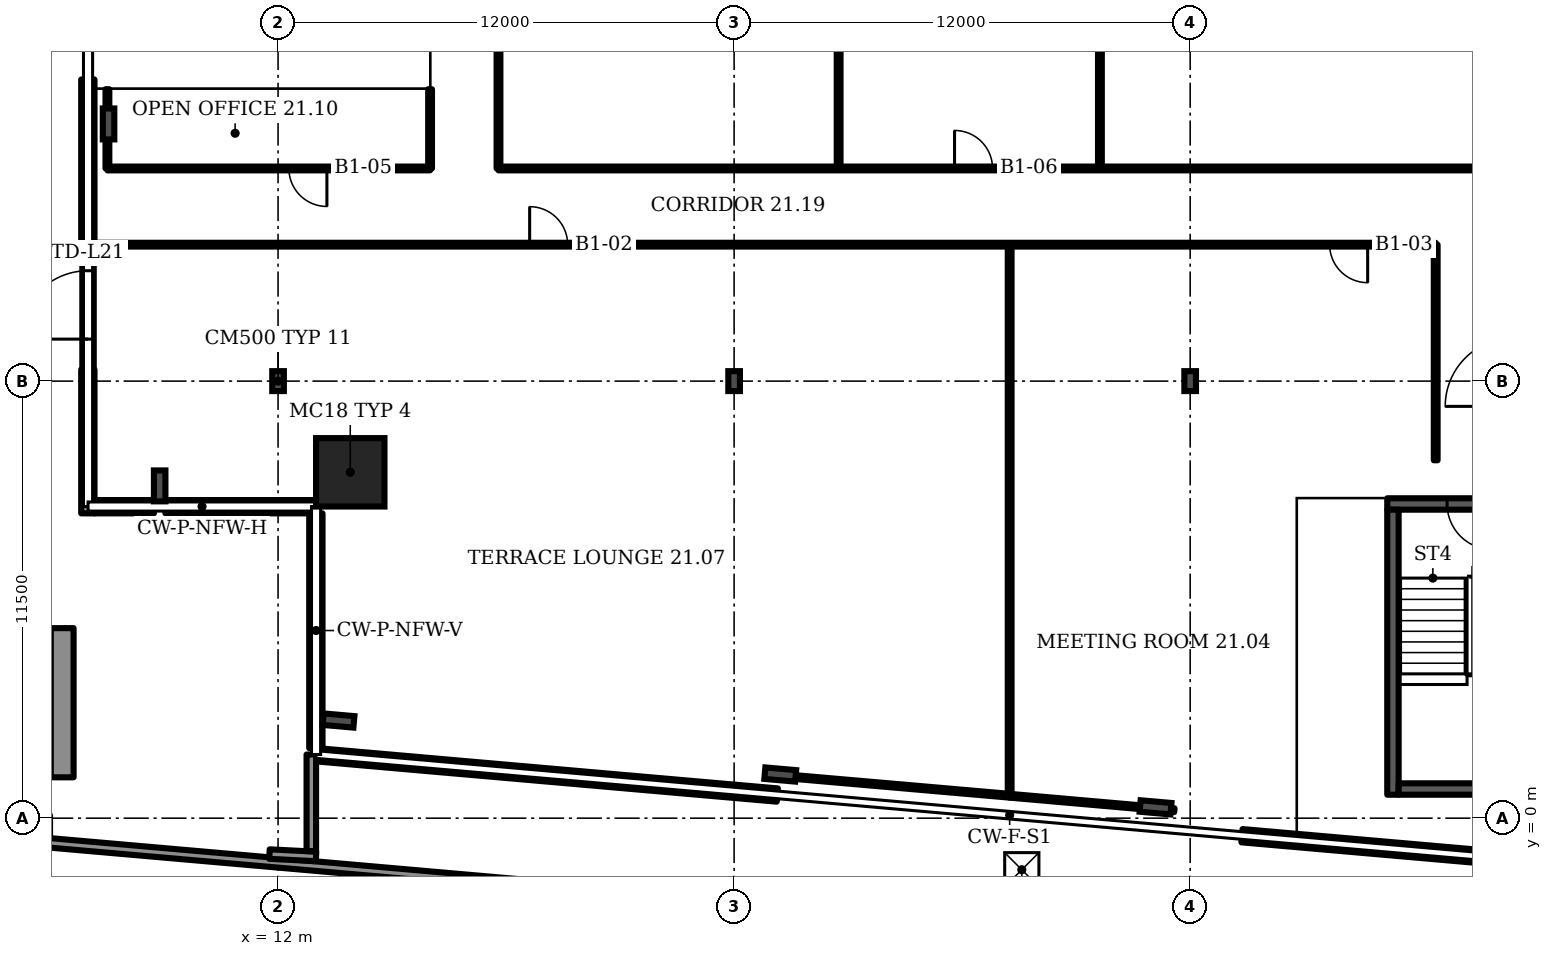
"""IFC4 building model, lengths in metres.
Left out: names, types, materials, properties, quantities, classifications, styles, units other than length and angle.
Written with IfcOpenShell. Run it as: python <this file> out.ifc"""

import sys

from ifc_helpers import new_model, si_unit, direction, frame, frame_2d, origin, origin_2d, place, context, subcontext, project, spatial, rectangle, i_section, extrude, element, fill, save


model = new_model("IFC4")
c1 = context("Model", 3, precision=1e-05, world=origin(), true_north=direction((0.0, 1.0)))
c2 = subcontext(c1, "Body", "Model", "MODEL_VIEW")
j1 = project(units=[si_unit("LENGTHUNIT", "METRE"), si_unit("PLANEANGLEUNIT", "RADIAN")], contexts=[c1])
p1 = place(None, origin())
s1 = spatial("IfcSite", under=j1, at=p1, CompositionType="ELEMENT")
p2 = place(p1, origin())
s2 = spatial("IfcBuilding", under=s1, at=p2, CompositionType="ELEMENT")
p3 = place(p2, frame((0.0, 0.0, 96.7)))
s3 = spatial("IfcBuildingStorey", under=s2, at=p3, CompositionType="ELEMENT", Elevation=96.7)
p4 = place(p3, frame((13.9, 9.1, 0.0), z_axis=(0.0, 0.0, 1.0), x_axis=(1.0, 0.0, 0.0)))
e1 = element("IfcColumn", 1, at=p4, inside=s3, PredefinedType="COLUMN", context=c2, shape_type="SweptSolid", body=[
    extrude(rectangle(XDim=1.8, YDim=1.8, at=origin_2d()), origin(), (0.0, 0.0, 1.0), 3.6),
])
for number, where, z_axis, x_axis in (
    (2, (13.591, 2.569, 0.0), (0.0, 0.0, 1.0), (-0.087, -0.996, 0.0)),
    (3, (25.214, 1.149, 0.0), (0.0, 0.0, 1.0), (-0.087, -0.996, 0.0)),
    (4, (35.089, 0.285, 0.0), (0.0, 0.0, 1.0), (-0.087, -0.996, 0.0)),
    (5, (7.54, 18.267, 0.0), (0.0, 0.0, 1.0), (-1.0, 0.0, 0.0)),
    (6, (8.885, 8.743, 0.0), (0.0, 0.0, 1.0), (-1.0, 0.0, 0.0)),
):
    element("IfcColumn", number, at=place(p3, frame(where, z_axis=z_axis, x_axis=x_axis)), inside=s3, PredefinedType="COLUMN", context=c2, shape_type="SweptSolid", body=[
        extrude(i_section(OverallWidth=0.303, OverallDepth=0.814, WebThickness=0.021, FlangeThickness=0.04, FilletRadius=0.03, at=origin_2d()), origin(), (0.0, 0.0, 1.0), 3.6),
    ])
for number, where, z_axis, x_axis in (
    (7, (12.0, 11.5, 0.0), (0.0, 0.0, 1.0), (1.0, 0.0, 0.0)),
    (8, (24.0, 11.5, 0.0), (0.0, 0.0, 1.0), (1.0, 0.0, 0.0)),
    (9, (36.0, 11.5, 0.0), (0.0, 0.0, 1.0), (1.0, 0.0, 0.0)),
):
    element("IfcColumn", number, at=place(p3, frame(where, z_axis=z_axis, x_axis=x_axis)), inside=s3, PredefinedType="COLUMN", context=c2, shape_type="SweptSolid", body=[
        extrude(i_section(OverallWidth=0.306, OverallDepth=0.524, WebThickness=0.021, FlangeThickness=0.04, FilletRadius=0.027, at=origin_2d()), origin(), (0.0, 0.0, 1.0), 3.6),
    ])
p5 = place(p3, frame((45.97, -4.147, 0.0), z_axis=(0.0, 0.0, 1.0), x_axis=(-0.996199, 0.087156, 0.0)))
e10 = element("IfcWall", 10, at=p5, inside=s3, PredefinedType="PARAPET", context=c2, shape_type="SweptSolid", body=[
    extrude(rectangle(XDim=40.259, YDim=0.25, at=frame_2d((20.129, 0.0))), origin(), (0.0, 0.0, 1.0), 1.1),
])
p6 = place(p3, frame((11.773, -0.945, 0.0), z_axis=(0.0, 0.0, 1.0), x_axis=(0.998698, -0.051088, 0.0)))
e11 = element("IfcWall", 11, at=p6, inside=s3, PredefinedType="PARAPET", context=c2, shape_type="SweptSolid", body=[
    extrude(rectangle(XDim=1.228, YDim=0.25, at=frame_2d((0.614, 0.0))), origin(), (0.0, 0.0, 1.0), 1.1),
])
p7 = place(p3, frame((12.875, -0.866, 0.0), z_axis=(0.0, 0.0, 1.0), x_axis=(0.0, 1.0, 0.0)))
e12 = element("IfcWall", 12, at=p7, inside=s3, PredefinedType="PARAPET", context=c2, shape_type="SweptSolid", body=[
    extrude(rectangle(XDim=2.541, YDim=0.25, at=frame_2d((1.271, 0.0))), origin(), (0.0, 0.0, 1.0), 1.1),
])
p8 = place(p3, frame((6.32, 1.075, 0.0), z_axis=(0.0, 0.0, 1.0), x_axis=(0.0, 1.0, 0.0)))
e13 = element("IfcWall", 13, at=p8, inside=s3, PredefinedType="SOLIDWALL", context=c2, shape_type="SweptSolid", body=[
    extrude(rectangle(XDim=3.925, YDim=0.6, at=frame_2d((1.962, 0.0))), origin(), (0.0, 0.0, 1.0), 0.8),
])
p9 = place(p3, frame((13.015, 1.669, 0.0), z_axis=(0.0, 0.0, 1.0), x_axis=(0.996194, -0.087163, 0.0)))
e14 = element("IfcWall", 14, at=p9, inside=s3, PredefinedType="SOLIDWALL", context=c2, shape_type="SweptSolid", body=[
    extrude(rectangle(XDim=12.167, YDim=0.35, at=frame_2d((6.084, 0.0))), origin(), (0.0, 0.0, 1.0), 1.0),
])
p10 = place(p3, frame((37.363, -0.461, 0.0), z_axis=(0.0, 0.0, 1.0), x_axis=(0.996194, -0.087159, 0.0)))
e15 = element("IfcWall", 15, at=p10, inside=s3, PredefinedType="SOLIDWALL", context=c2, shape_type="SweptSolid", body=[
    extrude(rectangle(XDim=12.199, YDim=0.35, at=frame_2d((6.099, 0.0))), origin(), (0.0, 0.0, 1.0), 1.0),
])
p11 = place(p3, frame((6.995, 19.437, 0.0), z_axis=(0.0, 0.0, 1.0), x_axis=(0.0, -1.0, 0.0)))
e16 = element("IfcWall", 16, at=p11, inside=s3, PredefinedType="SOLIDWALL", context=c2, shape_type="SweptSolid", body=[
    extrude(rectangle(XDim=4.232, YDim=0.35, at=frame_2d((2.116, 0.0))), origin(), (0.0, 0.0, 1.0), 1.0),
])
p12 = place(p3, frame((6.995, 11.805, 0.0), z_axis=(0.0, 0.0, 1.0), x_axis=(0.0, -1.0, 0.0)))
e17 = element("IfcWall", 17, at=p12, inside=s3, PredefinedType="SOLIDWALL", context=c2, shape_type="SweptSolid", body=[
    extrude(rectangle(XDim=3.785, YDim=0.35, at=frame_2d((1.892, 0.0))), origin(), (0.0, 0.0, 1.0), 1.0),
])
p13 = place(p3, frame((7.17, 8.195, 0.0), z_axis=(0.0, 0.0, 1.0), x_axis=(1.0, 0.0, 0.0)))
e18 = element("IfcWall", 18, at=p13, inside=s3, PredefinedType="SOLIDWALL", context=c2, shape_type="SweptSolid", body=[
    extrude(rectangle(XDim=1.563, YDim=0.35, at=frame_2d((0.782, 0.0))), origin(), (0.0, 0.0, 1.0), 1.0),
])
p14 = place(p3, frame((9.036, 8.195, 0.0), z_axis=(0.0, 0.0, 1.0), x_axis=(1.0, 0.0, 0.0)))
e19 = element("IfcWall", 19, at=p14, inside=s3, PredefinedType="SOLIDWALL", context=c2, shape_type="SweptSolid", body=[
    extrude(rectangle(XDim=3.964, YDim=0.35, at=frame_2d((1.982, 0.0))), origin(), (0.0, 0.0, 1.0), 1.0),
])
p15 = place(p3, frame((12.995, 8.02, 0.0), z_axis=(0.0, 0.0, 1.0), x_axis=(0.0, -1.0, 0.0)))
e20 = element("IfcWall", 20, at=p15, inside=s3, PredefinedType="SOLIDWALL", context=c2, shape_type="SweptSolid", body=[
    extrude(rectangle(XDim=6.177, YDim=0.35, at=frame_2d((3.088, 0.0))), origin(), (0.0, 0.0, 1.0), 1.0),
])
p16 = place(p3, frame((41.185, 8.267, 0.0), z_axis=(0.0, 0.0, 1.0), x_axis=(1.0, 0.0, 0.0)))
e21 = element("IfcWall", 21, at=p16, inside=s3, PredefinedType="SHEAR", context=c2, shape_type="SweptSolid", body=[
    extrude(rectangle(XDim=4.35, YDim=0.3, at=frame_2d((2.175, 0.0))), origin(), (0.0, 0.0, 1.0), 3.2),
])
p17 = place(p16, frame((1.575, 0.0, 0.0)))
e22 = element("IfcOpeningElement", 22, at=p17, cuts=e21, PredefinedType="OPENING", context=c2, shape_type="SweptSolid", body=[
    extrude(rectangle(XDim=1.2, YDim=2.1, at=frame_2d((0.6, 1.05))), frame((0.0, 0.16, 0.0), z_axis=(0.0, -1.0, 0.0), x_axis=(1.0, 0.0, 0.0)), (0.0, 0.0, 1.0), 0.32),
])
p18 = place(p3, frame((7.02, 15.09, 0.0), z_axis=(0.0, 0.0, 1.0), x_axis=(1.0, 0.0, 0.0)))
e23 = element("IfcWall", 23, at=p18, inside=s3, PredefinedType="PARTITIONING", context=c2, shape_type="SweptSolid", body=[
    extrude(rectangle(XDim=35.44, YDim=0.1, at=frame_2d((17.72, 0.0))), origin(), (0.0, 0.0, 1.0), 3.2),
])
p19 = place(p18, frame((11.6, 0.0, 0.0)))
e24 = element("IfcOpeningElement", 24, at=p19, cuts=e23, PredefinedType="OPENING", context=c2, shape_type="SweptSolid", body=[
    extrude(rectangle(XDim=1.0, YDim=2.1, at=frame_2d((0.5, 1.05))), frame((0.0, 0.06, 0.0), z_axis=(0.0, -1.0, 0.0), x_axis=(1.0, 0.0, 0.0)), (0.0, 0.0, 1.0), 0.12),
])
p20 = place(p18, frame((32.65, 0.0, 0.0)))
e25 = element("IfcOpeningElement", 25, at=p20, cuts=e23, PredefinedType="OPENING", context=c2, shape_type="SweptSolid", body=[
    extrude(rectangle(XDim=1.0, YDim=2.1, at=frame_2d((0.5, 1.05))), frame((0.0, 0.06, 0.0), z_axis=(0.0, -1.0, 0.0), x_axis=(1.0, 0.0, 0.0)), (0.0, 0.0, 1.0), 0.12),
])
p21 = place(p3, frame((7.51, 17.095, 0.0), z_axis=(0.0, 0.0, 1.0), x_axis=(0.0, 1.0, 0.0)))
e26 = element("IfcWall", 26, at=p21, inside=s3, PredefinedType="PARTITIONING", context=c2, shape_type="SweptSolid", body=[
    extrude(rectangle(XDim=2.085, YDim=0.1, at=frame_2d((1.042, 0.0))), origin(), (0.0, 0.0, 1.0), 2.58),
])
p22 = place(p3, frame((7.51, 17.095, 0.0), z_axis=(0.0, 0.0, 1.0), x_axis=(1.0, 0.0, 0.0)))
e27 = element("IfcWall", 27, at=p22, inside=s3, PredefinedType="PARTITIONING", context=c2, shape_type="SweptSolid", body=[
    extrude(rectangle(XDim=8.49, YDim=0.1, at=frame_2d((4.245, 0.0))), origin(), (0.0, 0.0, 1.0), 3.2),
])
p23 = place(p22, frame((4.775, 0.0, 0.0)))
e28 = element("IfcOpeningElement", 28, at=p23, cuts=e27, PredefinedType="OPENING", context=c2, shape_type="SweptSolid", body=[
    extrude(rectangle(XDim=1.0, YDim=2.1, at=frame_2d((0.5, 1.05))), frame((0.0, 0.06, 0.0), z_axis=(0.0, -1.0, 0.0), x_axis=(1.0, 0.0, 0.0)), (0.0, 0.0, 1.0), 0.12),
])
p24 = place(p3, frame((16.0, 17.095, 0.0), z_axis=(0.0, 0.0, 1.0), x_axis=(0.0, 1.0, 0.0)))
e29 = element("IfcWall", 29, at=p24, inside=s3, PredefinedType="PARTITIONING", context=c2, shape_type="SweptSolid", body=[
    extrude(rectangle(XDim=2.085, YDim=0.1, at=frame_2d((1.042, 0.0))), origin(), (0.0, 0.0, 1.0), 3.2),
])
p25 = place(p3, frame((17.8, 17.095, 0.0), z_axis=(0.0, 0.0, 1.0), x_axis=(0.0, 1.0, 0.0)))
e30 = element("IfcWall", 30, at=p25, inside=s3, PredefinedType="PARTITIONING", context=c2, shape_type="SweptSolid", body=[
    extrude(rectangle(XDim=4.075, YDim=0.1, at=frame_2d((2.038, 0.0))), origin(), (0.0, 0.0, 1.0), 3.2),
])
p26 = place(p3, frame((17.8, 17.095, 0.0), z_axis=(0.0, 0.0, 1.0), x_axis=(1.0, 0.0, 0.0)))
e31 = element("IfcWall", 31, at=p26, inside=s3, PredefinedType="PARTITIONING", context=c2, shape_type="SweptSolid", body=[
    extrude(rectangle(XDim=67.8, YDim=0.1, at=frame_2d((33.9, 0.0))), origin(), (0.0, 0.0, 1.0), 3.2),
])
p27 = place(p26, frame((12.0, 0.0, 0.0)))
e32 = element("IfcOpeningElement", 32, at=p27, cuts=e31, PredefinedType="OPENING", context=c2, shape_type="SweptSolid", body=[
    extrude(rectangle(XDim=1.0, YDim=2.1, at=frame_2d((0.5, 1.05))), frame((0.0, 0.06, 0.0), z_axis=(0.0, -1.0, 0.0), x_axis=(1.0, 0.0, 0.0)), (0.0, 0.0, 1.0), 0.12),
])
p28 = place(p26, frame((48.5, 0.0, 0.0)))
e33 = element("IfcOpeningElement", 33, at=p28, cuts=e31, PredefinedType="OPENING", context=c2, shape_type="SweptSolid", body=[
    extrude(rectangle(XDim=1.8, YDim=2.1, at=frame_2d((0.9, 1.05))), frame((0.0, 0.06, 0.0), z_axis=(0.0, -1.0, 0.0), x_axis=(1.0, 0.0, 0.0)), (0.0, 0.0, 1.0), 0.12),
])
p29 = place(p26, frame((56.825, 0.0, 0.0)))
e34 = element("IfcOpeningElement", 34, at=p29, cuts=e31, PredefinedType="OPENING", context=c2, shape_type="SweptSolid", body=[
    extrude(rectangle(XDim=1.0, YDim=2.1, at=frame_2d((0.5, 1.05))), frame((0.0, 0.06, 0.0), z_axis=(0.0, -1.0, 0.0), x_axis=(1.0, 0.0, 0.0)), (0.0, 0.0, 1.0), 0.12),
])
p30 = place(p26, frame((60.825, 0.0, 0.0)))
e35 = element("IfcOpeningElement", 35, at=p30, cuts=e31, PredefinedType="OPENING", context=c2, shape_type="SweptSolid", body=[
    extrude(rectangle(XDim=1.0, YDim=2.1, at=frame_2d((0.5, 1.05))), frame((0.0, 0.06, 0.0), z_axis=(0.0, -1.0, 0.0), x_axis=(1.0, 0.0, 0.0)), (0.0, 0.0, 1.0), 0.12),
])
p31 = place(p26, frame((64.981, 0.0, 0.0)))
e36 = element("IfcOpeningElement", 36, at=p31, cuts=e31, PredefinedType="OPENING", context=c2, shape_type="SweptSolid", body=[
    extrude(rectangle(XDim=1.0, YDim=2.1, at=frame_2d((0.5, 1.05))), frame((0.0, 0.06, 0.0), z_axis=(0.0, -1.0, 0.0), x_axis=(1.0, 0.0, 0.0)), (0.0, 0.0, 1.0), 0.12),
])
p32 = place(p3, frame((26.75, 17.095, 0.0), z_axis=(0.0, 0.0, 1.0), x_axis=(0.0, 1.0, 0.0)))
e37 = element("IfcWall", 37, at=p32, inside=s3, PredefinedType="PARTITIONING", context=c2, shape_type="SweptSolid", body=[
    extrude(rectangle(XDim=13.405, YDim=0.1, at=frame_2d((6.703, 0.0))), origin(), (0.0, 0.0, 1.0), 3.2),
])
p33 = place(p3, frame((31.25, 0.59, 0.0), z_axis=(0.0, 0.0, 1.0), x_axis=(-0.996225, 0.086776, 0.0)))
e38 = element("IfcWall", 38, at=p33, inside=s3, PredefinedType="PARTITIONING", context=c2, shape_type="SweptSolid", body=[
    extrude(rectangle(XDim=6.108, YDim=0.1, at=frame_2d((3.054, 0.0))), origin(), (0.0, 0.0, 1.0), 2.58),
])
p34 = place(p3, frame((31.25, 0.59, 0.0), z_axis=(0.0, 0.0, 1.0), x_axis=(0.0, 1.0, 0.0)))
e39 = element("IfcWall", 39, at=p34, inside=s3, PredefinedType="PARTITIONING", context=c2, shape_type="SweptSolid", body=[
    extrude(rectangle(XDim=14.5, YDim=0.1, at=frame_2d((7.25, 0.0))), origin(), (0.0, 0.0, 1.0), 3.2),
])
p35 = place(p3, frame((33.625, 17.095, 0.0), z_axis=(0.0, 0.0, 1.0), x_axis=(0.0, 1.0, 0.0)))
e40 = element("IfcWall", 40, at=p35, inside=s3, PredefinedType="PARTITIONING", context=c2, shape_type="SweptSolid", body=[
    extrude(rectangle(XDim=13.405, YDim=0.1, at=frame_2d((6.703, 0.0))), origin(), (0.0, 0.0, 1.0), 3.2),
])
p36 = place(p3, frame((35.585, 0.21, 0.0), z_axis=(0.0, 0.0, 1.0), x_axis=(-0.996173, 0.087353, 0.0)))
e41 = element("IfcWall", 41, at=p36, inside=s3, PredefinedType="PARTITIONING", context=c2, shape_type="SweptSolid", body=[
    extrude(rectangle(XDim=4.352, YDim=0.1, at=frame_2d((2.176, 0.0))), origin(), (0.0, 0.0, 1.0), 2.58),
])
p37 = place(p3, frame((42.46, 9.417, 0.0), z_axis=(0.0, 0.0, 1.0), x_axis=(0.0, 1.0, 0.0)))
e42 = element("IfcWall", 42, at=p37, inside=s3, PredefinedType="PARTITIONING", context=c2, shape_type="SweptSolid", body=[
    extrude(rectangle(XDim=5.673, YDim=0.1, at=frame_2d((2.836, 0.0))), origin(), (0.0, 0.0, 1.0), 3.2),
])
p38 = place(p3, frame((7.0, 11.805, 0.0), z_axis=(0.0, 0.0, 1.0), x_axis=(0.0, 1.0, 0.0)))
e43 = element("IfcWall", 43, at=p38, inside=s3, PredefinedType="SOLIDWALL", context=c2, shape_type="SweptSolid", body=[
    extrude(rectangle(XDim=3.4, YDim=0.3, at=frame_2d((1.7, 0.0))), origin(), (0.0, 0.0, 1.0), 3.2),
])
p39 = place(p38, frame((0.8, 0.0, 0.0)))
e44 = element("IfcOpeningElement", 44, at=p39, cuts=e43, PredefinedType="OPENING", context=c2, shape_type="SweptSolid", body=[
    extrude(rectangle(XDim=1.8, YDim=2.1, at=frame_2d((0.9, 1.05))), frame((0.0, 0.16, 0.0), z_axis=(0.0, -1.0, 0.0), x_axis=(1.0, 0.0, 0.0)), (0.0, 0.0, 1.0), 0.32),
])
p40 = place(p3, frame((41.335, 0.617, 0.0), z_axis=(0.0, 0.0, 1.0), x_axis=(0.0, 1.0, 0.0)))
e45 = element("IfcWall", 45, at=p40, inside=s3, PredefinedType="SHEAR", context=c2, shape_type="SweptSolid", body=[
    extrude(rectangle(XDim=7.5, YDim=0.3, at=frame_2d((3.75, 0.0))), origin(), (0.0, 0.0, 1.0), 3.2),
])
p41 = place(p3, frame((41.485, 0.767, 0.0), z_axis=(0.0, 0.0, 1.0), x_axis=(1.0, 0.0, 0.0)))
e46 = element("IfcWall", 46, at=p41, inside=s3, PredefinedType="SHEAR", context=c2, shape_type="SweptSolid", body=[
    extrude(rectangle(XDim=3.75, YDim=0.3, at=frame_2d((1.875, 0.0))), origin(), (0.0, 0.0, 1.0), 3.2),
])
p42 = place(p3, frame((0.0, 0.0, -0.4)))
p43 = place(p42, frame((31.57, -1.357, 0.0)))
p44 = place(p43, frame((0.0, 0.0, 0.36)))
e47 = element("IfcDoor", 47, at=p44, inside=s3, OperationType="SINGLE_SWING_LEFT", PredefinedType="TRAPDOOR", context=c2, shape_type="SweptSolid", body=[
    extrude(rectangle(XDim=0.9, YDim=0.9, at=origin_2d()), origin(), (0.0, 0.0, 1.0), 0.05),
])
p45 = place(p17, origin())
e48 = element("IfcDoor", 48, at=p45, inside=s3, OperationType="SINGLE_SWING_RIGHT", PredefinedType="DOOR", context=c2, shape_type="SweptSolid", body=[
    extrude(rectangle(XDim=1.2, YDim=2.1, at=frame_2d((0.6, 1.05))), frame((0.0, 0.025, 0.0), z_axis=(0.0, -1.0, 0.0), x_axis=(1.0, 0.0, 0.0)), (0.0, 0.0, 1.0), 0.05),
])
fill(e22, e48)
p46 = place(p19, origin())
e49 = element("IfcDoor", 49, at=p46, inside=s3, OperationType="SINGLE_SWING_LEFT", PredefinedType="DOOR", context=c2, shape_type="SweptSolid", body=[
    extrude(rectangle(XDim=1.0, YDim=2.1, at=frame_2d((0.5, 1.05))), frame((0.0, 0.025, 0.0), z_axis=(0.0, -1.0, 0.0), x_axis=(1.0, 0.0, 0.0)), (0.0, 0.0, 1.0), 0.05),
])
fill(e24, e49)
p47 = place(p20, origin())
e50 = element("IfcDoor", 50, at=p47, inside=s3, OperationType="SINGLE_SWING_RIGHT", PredefinedType="DOOR", context=c2, shape_type="SweptSolid", body=[
    extrude(rectangle(XDim=1.0, YDim=2.1, at=frame_2d((0.5, 1.05))), frame((0.0, 0.025, 0.0), z_axis=(0.0, -1.0, 0.0), x_axis=(1.0, 0.0, 0.0)), (0.0, 0.0, 1.0), 0.05),
])
fill(e25, e50)
p48 = place(p23, origin())
e51 = element("IfcDoor", 51, at=p48, inside=s3, OperationType="SINGLE_SWING_RIGHT", PredefinedType="DOOR", context=c2, shape_type="SweptSolid", body=[
    extrude(rectangle(XDim=1.0, YDim=2.1, at=frame_2d((0.5, 1.05))), frame((0.0, 0.025, 0.0), z_axis=(0.0, -1.0, 0.0), x_axis=(1.0, 0.0, 0.0)), (0.0, 0.0, 1.0), 0.05),
])
fill(e28, e51)
p49 = place(p27, origin())
e52 = element("IfcDoor", 52, at=p49, inside=s3, OperationType="SINGLE_SWING_LEFT", PredefinedType="DOOR", context=c2, shape_type="SweptSolid", body=[
    extrude(rectangle(XDim=1.0, YDim=2.1, at=frame_2d((0.5, 1.05))), frame((0.0, 0.025, 0.0), z_axis=(0.0, -1.0, 0.0), x_axis=(1.0, 0.0, 0.0)), (0.0, 0.0, 1.0), 0.05),
])
fill(e32, e52)
p50 = place(p39, origin())
e53 = element("IfcDoor", 53, at=p50, inside=s3, OperationType="DOUBLE_DOOR_SINGLE_SWING", PredefinedType="DOOR", context=c2, shape_type="SweptSolid", body=[
    extrude(rectangle(XDim=1.8, YDim=2.1, at=frame_2d((0.9, 1.05))), frame((0.0, 0.025, 0.0), z_axis=(0.0, -1.0, 0.0), x_axis=(1.0, 0.0, 0.0)), (0.0, 0.0, 1.0), 0.05),
])
fill(e44, e53)
save(model, sys.argv[1])
